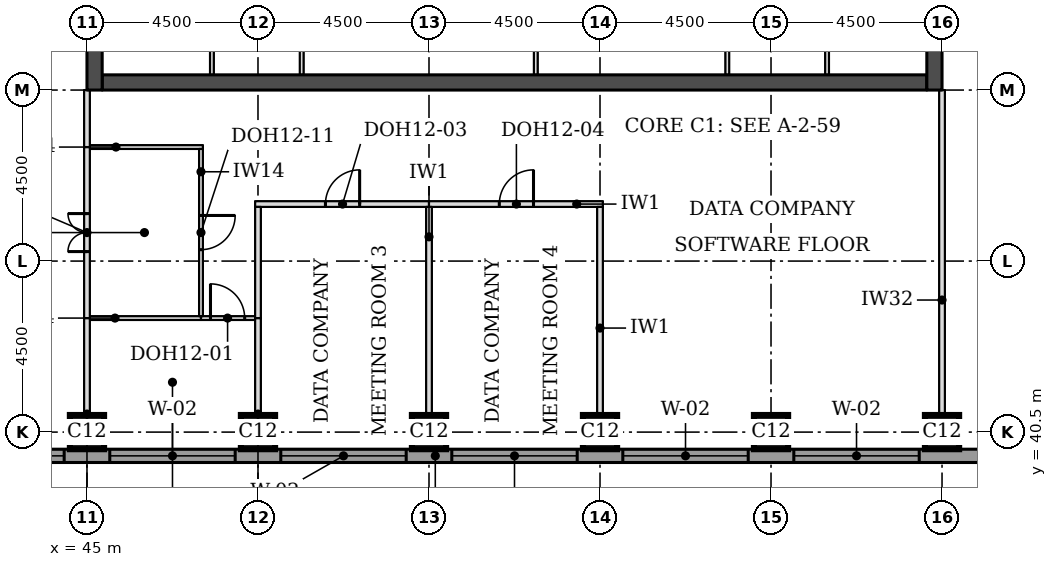
"""IFC4 building model, lengths in metres.
Left out: names, types, materials, properties, quantities, classifications, styles, units other than length and angle.
Written with IfcOpenShell. Run it as: python <this file> out.ifc"""

import sys

from ifc_helpers import new_model, si_unit, direction, frame, frame_2d, origin, origin_2d, place, context, subcontext, project, spatial, rectangle, extrude, element, fill, save


model = new_model("IFC4")
c1 = context("Model", 3, precision=1e-05, world=origin(), true_north=direction((0.0, 1.0)))
c2 = subcontext(c1, "Body", "Model", "MODEL_VIEW")
j1 = project(units=[si_unit("LENGTHUNIT", "METRE"), si_unit("PLANEANGLEUNIT", "RADIAN")], contexts=[c1])
p1 = place(None, origin())
s1 = spatial("IfcSite", under=j1, at=p1, CompositionType="ELEMENT")
p2 = place(p1, origin())
s2 = spatial("IfcBuilding", under=s1, at=p2, CompositionType="ELEMENT")
p3 = place(p2, frame((0.0, 0.0, 245.2)))
s3 = spatial("IfcBuildingStorey", under=s2, at=p3, CompositionType="ELEMENT", Elevation=245.2)
for number, where, z_axis, x_axis in (
    (1, (45.0, 40.5, 0.0), (0.0, 0.0, 1.0), (1.0, 0.0, 0.0)),
    (2, (49.5, 40.5, 0.0), (0.0, 0.0, 1.0), (1.0, 0.0, 0.0)),
    (3, (54.0, 40.5, 0.0), (0.0, 0.0, 1.0), (1.0, 0.0, 0.0)),
    (4, (58.5, 40.5, 0.0), (0.0, 0.0, 1.0), (1.0, 0.0, 0.0)),
    (5, (63.0, 40.5, 0.0), (0.0, 0.0, 1.0), (1.0, 0.0, 0.0)),
    (6, (67.5, 40.5, 0.0), (0.0, 0.0, 1.0), (1.0, 0.0, 0.0)),
):
    element("IfcColumn", number, at=place(p3, frame(where, z_axis=z_axis, x_axis=x_axis)), inside=s3, PredefinedType="COLUMN", context=c2, shape_type="SweptSolid", body=[
        extrude(rectangle(XDim=0.9, YDim=0.9, at=origin_2d()), origin(), (0.0, 0.0, 1.0), 3.7),
    ])
p4 = place(p3, frame((45.4, 49.7, 0.0), z_axis=(0.0, 0.0, 1.0), x_axis=(1.0, 0.0, 0.0)))
e7 = element("IfcWall", 7, at=p4, inside=s3, PredefinedType="SHEAR", context=c2, shape_type="SweptSolid", body=[
    extrude(rectangle(XDim=21.7, YDim=0.4, at=frame_2d((10.85, 0.0))), origin(), (0.0, 0.0, 1.0), 3.7),
])
p5 = place(p3, frame((45.2, 49.5, 0.0), z_axis=(0.0, 0.0, 1.0), x_axis=(0.0, 1.0, 0.0)))
e8 = element("IfcWall", 8, at=p5, inside=s3, PredefinedType="SHEAR", context=c2, shape_type="SweptSolid", body=[
    extrude(rectangle(XDim=22.5, YDim=0.4, at=frame_2d((11.25, 0.0))), origin(), (0.0, 0.0, 1.0), 3.7),
])
p6 = place(p5, frame((4.2, 0.0, 0.0)))
e9 = element("IfcOpeningElement", 9, at=p6, cuts=e8, PredefinedType="OPENING", context=c2, shape_type="SweptSolid", body=[
    extrude(rectangle(XDim=1.8, YDim=2.1, at=frame_2d((0.9, 1.05))), frame((0.0, 0.21, 0.0), z_axis=(0.0, -1.0, 0.0), x_axis=(1.0, 0.0, 0.0)), (0.0, 0.0, 1.0), 0.42),
])
p7 = place(p5, frame((6.9, 0.0, 0.0)))
e10 = element("IfcOpeningElement", 10, at=p7, cuts=e8, PredefinedType="OPENING", context=c2, shape_type="SweptSolid", body=[
    extrude(rectangle(XDim=1.1, YDim=2.1, at=frame_2d((0.55, 1.05))), frame((0.0, 0.21, 0.0), z_axis=(0.0, -1.0, 0.0), x_axis=(1.0, 0.0, 0.0)), (0.0, 0.0, 1.0), 0.42),
])
p8 = place(p5, frame((13.6, 0.0, 0.0)))
e11 = element("IfcOpeningElement", 11, at=p8, cuts=e8, PredefinedType="OPENING", context=c2, shape_type="SweptSolid", body=[
    extrude(rectangle(XDim=1.1, YDim=2.1, at=frame_2d((0.55, 1.05))), frame((0.0, 0.21, 0.0), z_axis=(0.0, -1.0, 0.0), x_axis=(1.0, 0.0, 0.0)), (0.0, 0.0, 1.0), 0.42),
])
p9 = place(p5, frame((16.5, 0.0, 0.0)))
e12 = element("IfcOpeningElement", 12, at=p9, cuts=e8, PredefinedType="OPENING", context=c2, shape_type="SweptSolid", body=[
    extrude(rectangle(XDim=1.8, YDim=2.1, at=frame_2d((0.9, 1.05))), frame((0.0, 0.21, 0.0), z_axis=(0.0, -1.0, 0.0), x_axis=(1.0, 0.0, 0.0)), (0.0, 0.0, 1.0), 0.42),
])
p10 = place(p3, frame((67.3, 49.5, 0.0), z_axis=(0.0, 0.0, 1.0), x_axis=(0.0, 1.0, 0.0)))
e13 = element("IfcWall", 13, at=p10, inside=s3, PredefinedType="SHEAR", context=c2, shape_type="SweptSolid", body=[
    extrude(rectangle(XDim=22.5, YDim=0.4, at=frame_2d((11.25, 0.0))), origin(), (0.0, 0.0, 1.0), 3.7),
])
p11 = place(p10, frame((4.2, 0.0, 0.0)))
e14 = element("IfcOpeningElement", 14, at=p11, cuts=e13, PredefinedType="OPENING", context=c2, shape_type="SweptSolid", body=[
    extrude(rectangle(XDim=1.8, YDim=2.1, at=frame_2d((0.9, 1.05))), frame((0.0, 0.21, 0.0), z_axis=(0.0, -1.0, 0.0), x_axis=(1.0, 0.0, 0.0)), (0.0, 0.0, 1.0), 0.42),
])
p12 = place(p10, frame((6.9, 0.0, 0.0)))
e15 = element("IfcOpeningElement", 15, at=p12, cuts=e13, PredefinedType="OPENING", context=c2, shape_type="SweptSolid", body=[
    extrude(rectangle(XDim=1.1, YDim=2.1, at=frame_2d((0.55, 1.05))), frame((0.0, 0.21, 0.0), z_axis=(0.0, -1.0, 0.0), x_axis=(1.0, 0.0, 0.0)), (0.0, 0.0, 1.0), 0.42),
])
p13 = place(p10, frame((13.6, 0.0, 0.0)))
e16 = element("IfcOpeningElement", 16, at=p13, cuts=e13, PredefinedType="OPENING", context=c2, shape_type="SweptSolid", body=[
    extrude(rectangle(XDim=1.1, YDim=2.1, at=frame_2d((0.55, 1.05))), frame((0.0, 0.21, 0.0), z_axis=(0.0, -1.0, 0.0), x_axis=(1.0, 0.0, 0.0)), (0.0, 0.0, 1.0), 0.42),
])
p14 = place(p10, frame((16.5, 0.0, 0.0)))
e17 = element("IfcOpeningElement", 17, at=p14, cuts=e13, PredefinedType="OPENING", context=c2, shape_type="SweptSolid", body=[
    extrude(rectangle(XDim=1.8, YDim=2.1, at=frame_2d((0.9, 1.05))), frame((0.0, 0.21, 0.0), z_axis=(0.0, -1.0, 0.0), x_axis=(1.0, 0.0, 0.0)), (0.0, 0.0, 1.0), 0.42),
])
p15 = place(p3, frame((36.0, 39.875, 0.0), z_axis=(0.0, 0.0, 1.0), x_axis=(1.0, 0.0, 0.0)))
e18 = element("IfcWall", 18, at=p15, inside=s3, PredefinedType="STANDARD", context=c2, shape_type="SweptSolid", body=[
    extrude(rectangle(XDim=36.331, YDim=0.35, at=frame_2d((18.166, 0.0))), origin(), (0.0, 0.0, 1.0), 3.525),
])
p16 = place(p15, frame((5.1, 0.0, 0.9)))
e19 = element("IfcOpeningElement", 19, at=p16, cuts=e18, PredefinedType="OPENING", context=c2, shape_type="SweptSolid", body=[
    extrude(rectangle(XDim=3.3, YDim=1.9, at=frame_2d((1.65, 0.95))), frame((0.0, 0.185, 0.0), z_axis=(0.0, -1.0, 0.0), x_axis=(1.0, 0.0, 0.0)), (0.0, 0.0, 1.0), 0.37),
])
p17 = place(p15, frame((9.6, 0.0, 0.9)))
e20 = element("IfcOpeningElement", 20, at=p17, cuts=e18, PredefinedType="OPENING", context=c2, shape_type="SweptSolid", body=[
    extrude(rectangle(XDim=3.3, YDim=1.9, at=frame_2d((1.65, 0.95))), frame((0.0, 0.185, 0.0), z_axis=(0.0, -1.0, 0.0), x_axis=(1.0, 0.0, 0.0)), (0.0, 0.0, 1.0), 0.37),
])
p18 = place(p15, frame((14.1, 0.0, 0.9)))
e21 = element("IfcOpeningElement", 21, at=p18, cuts=e18, PredefinedType="OPENING", context=c2, shape_type="SweptSolid", body=[
    extrude(rectangle(XDim=3.3, YDim=1.9, at=frame_2d((1.65, 0.95))), frame((0.0, 0.185, 0.0), z_axis=(0.0, -1.0, 0.0), x_axis=(1.0, 0.0, 0.0)), (0.0, 0.0, 1.0), 0.37),
])
p19 = place(p15, frame((18.6, 0.0, 0.9)))
e22 = element("IfcOpeningElement", 22, at=p19, cuts=e18, PredefinedType="OPENING", context=c2, shape_type="SweptSolid", body=[
    extrude(rectangle(XDim=3.3, YDim=1.9, at=frame_2d((1.65, 0.95))), frame((0.0, 0.185, 0.0), z_axis=(0.0, -1.0, 0.0), x_axis=(1.0, 0.0, 0.0)), (0.0, 0.0, 1.0), 0.37),
])
p20 = place(p15, frame((23.1, 0.0, 0.9)))
e23 = element("IfcOpeningElement", 23, at=p20, cuts=e18, PredefinedType="OPENING", context=c2, shape_type="SweptSolid", body=[
    extrude(rectangle(XDim=3.3, YDim=1.9, at=frame_2d((1.65, 0.95))), frame((0.0, 0.185, 0.0), z_axis=(0.0, -1.0, 0.0), x_axis=(1.0, 0.0, 0.0)), (0.0, 0.0, 1.0), 0.37),
])
p21 = place(p15, frame((27.6, 0.0, 0.9)))
e24 = element("IfcOpeningElement", 24, at=p21, cuts=e18, PredefinedType="OPENING", context=c2, shape_type="SweptSolid", body=[
    extrude(rectangle(XDim=3.3, YDim=1.9, at=frame_2d((1.65, 0.95))), frame((0.0, 0.185, 0.0), z_axis=(0.0, -1.0, 0.0), x_axis=(1.0, 0.0, 0.0)), (0.0, 0.0, 1.0), 0.37),
])
p22 = place(p3, frame((45.075, 43.5, 0.0), z_axis=(0.0, 0.0, 1.0), x_axis=(1.0, 0.0, 0.0)))
e25 = element("IfcWall", 25, at=p22, inside=s3, PredefinedType="PARTITIONING", context=c2, shape_type="SweptSolid", body=[
    extrude(rectangle(XDim=2.925, YDim=0.1, at=frame_2d((1.462, 0.0))), origin(), (0.0, 0.0, 1.0), 3.55),
])
p23 = place(p3, frame((48.0, 43.5, 0.0), z_axis=(0.0, 0.0, 1.0), x_axis=(1.0, 0.0, 0.0)))
e26 = element("IfcWall", 26, at=p23, inside=s3, PredefinedType="PARTITIONING", context=c2, shape_type="SweptSolid", body=[
    extrude(rectangle(XDim=1.425, YDim=0.1, at=frame_2d((0.712, 0.0))), origin(), (0.0, 0.0, 1.0), 3.55),
])
p24 = place(p23, frame((0.25, 0.0, 0.0)))
e27 = element("IfcOpeningElement", 27, at=p24, cuts=e26, PredefinedType="OPENING", context=c2, shape_type="SweptSolid", body=[
    extrude(rectangle(XDim=0.9, YDim=2.1, at=frame_2d((0.45, 1.05))), frame((0.0, 0.06, 0.0), z_axis=(0.0, -1.0, 0.0), x_axis=(1.0, 0.0, 0.0)), (0.0, 0.0, 1.0), 0.12),
])
p25 = place(p3, frame((49.425, 46.5, 0.0), z_axis=(0.0, 0.0, 1.0), x_axis=(1.0, 0.0, 0.0)))
e28 = element("IfcWall", 28, at=p25, inside=s3, PredefinedType="PARTITIONING", context=c2, shape_type="SweptSolid", body=[
    extrude(rectangle(XDim=4.575, YDim=0.15, at=frame_2d((2.288, 0.0))), origin(), (0.0, 0.0, 1.0), 3.55),
])
p26 = place(p25, frame((1.85, 0.0, 0.0)))
e29 = element("IfcOpeningElement", 29, at=p26, cuts=e28, PredefinedType="OPENING", context=c2, shape_type="SweptSolid", body=[
    extrude(rectangle(XDim=0.9, YDim=2.1, at=frame_2d((0.45, 1.05))), frame((0.0, 0.085, 0.0), z_axis=(0.0, -1.0, 0.0), x_axis=(1.0, 0.0, 0.0)), (0.0, 0.0, 1.0), 0.17),
])
p27 = place(p3, frame((54.0, 46.5, 0.0), z_axis=(0.0, 0.0, 1.0), x_axis=(1.0, 0.0, 0.0)))
e30 = element("IfcWall", 30, at=p27, inside=s3, PredefinedType="PARTITIONING", context=c2, shape_type="SweptSolid", body=[
    extrude(rectangle(XDim=4.575, YDim=0.15, at=frame_2d((2.288, 0.0))), origin(), (0.0, 0.0, 1.0), 3.55),
])
p28 = place(p27, frame((1.85, 0.0, 0.0)))
e31 = element("IfcOpeningElement", 31, at=p28, cuts=e30, PredefinedType="OPENING", context=c2, shape_type="SweptSolid", body=[
    extrude(rectangle(XDim=0.9, YDim=2.1, at=frame_2d((0.45, 1.05))), frame((0.0, 0.085, 0.0), z_axis=(0.0, -1.0, 0.0), x_axis=(1.0, 0.0, 0.0)), (0.0, 0.0, 1.0), 0.17),
])
p29 = place(p3, frame((45.075, 48.0, 0.0), z_axis=(0.0, 0.0, 1.0), x_axis=(1.0, 0.0, 0.0)))
e32 = element("IfcWall", 32, at=p29, inside=s3, PredefinedType="PARTITIONING", context=c2, shape_type="SweptSolid", body=[
    extrude(rectangle(XDim=2.975, YDim=0.1, at=frame_2d((1.488, 0.0))), origin(), (0.0, 0.0, 1.0), 3.55),
])
p30 = place(p3, frame((45.0, 40.05, 0.0), z_axis=(0.0, 0.0, 1.0), x_axis=(0.0, 1.0, 0.0)))
e33 = element("IfcWall", 33, at=p30, inside=s3, PredefinedType="PARTITIONING", context=c2, shape_type="SweptSolid", body=[
    extrude(rectangle(XDim=3.45, YDim=0.15, at=frame_2d((1.725, 0.0))), origin(), (0.0, 0.0, 1.0), 3.022),
])
p31 = place(p3, frame((49.5, 40.05, 0.0), z_axis=(0.0, 0.0, 1.0), x_axis=(0.0, 1.0, 0.0)))
e34 = element("IfcWall", 34, at=p31, inside=s3, PredefinedType="PARTITIONING", context=c2, shape_type="SweptSolid", body=[
    extrude(rectangle(XDim=3.45, YDim=0.15, at=frame_2d((1.725, 0.0))), origin(), (0.0, 0.0, 1.0), 3.55),
])
for number, where, z_axis, x_axis in (
    (35, (54.0, 40.05, 0.0), (0.0, 0.0, 1.0), (0.0, 1.0, 0.0)),
    (36, (58.5, 40.05, 0.0), (0.0, 0.0, 1.0), (0.0, 1.0, 0.0)),
):
    element("IfcWall", number, at=place(p3, frame(where, z_axis=z_axis, x_axis=x_axis)), inside=s3, PredefinedType="PARTITIONING", context=c2, shape_type="SweptSolid", body=[
        extrude(rectangle(XDim=6.375, YDim=0.15, at=frame_2d((3.188, 0.0))), origin(), (0.0, 0.0, 1.0), 3.55),
    ])
p32 = place(p3, frame((67.5, 40.05, 0.0), z_axis=(0.0, 0.0, 1.0), x_axis=(0.0, 1.0, 0.0)))
e37 = element("IfcWall", 37, at=p32, inside=s3, PredefinedType="PARTITIONING", context=c2, shape_type="SweptSolid", body=[
    extrude(rectangle(XDim=9.45, YDim=0.15, at=frame_2d((4.725, 0.0))), origin(), (0.0, 0.0, 1.0), 3.022),
])
p33 = place(p3, frame((45.0, 43.5, 0.0), z_axis=(0.0, 0.0, 1.0), x_axis=(0.0, 1.0, 0.0)))
e38 = element("IfcWall", 38, at=p33, inside=s3, PredefinedType="PARTITIONING", context=c2, shape_type="SweptSolid", body=[
    extrude(rectangle(XDim=4.5, YDim=0.15, at=frame_2d((2.25, 0.0))), origin(), (0.0, 0.0, 1.0), 3.022),
])
p34 = place(p33, frame((1.75, 0.0, 0.0)))
e39 = element("IfcOpeningElement", 39, at=p34, cuts=e38, PredefinedType="OPENING", context=c2, shape_type="SweptSolid", body=[
    extrude(rectangle(XDim=1.0, YDim=2.1, at=frame_2d((0.5, 1.05))), frame((0.0, 0.085, 0.0), z_axis=(0.0, -1.0, 0.0), x_axis=(1.0, 0.0, 0.0)), (0.0, 0.0, 1.0), 0.17),
])
p35 = place(p3, frame((49.5, 43.5, 0.0), z_axis=(0.0, 0.0, 1.0), x_axis=(0.0, 1.0, 0.0)))
e40 = element("IfcWall", 40, at=p35, inside=s3, PredefinedType="PARTITIONING", context=c2, shape_type="SweptSolid", body=[
    extrude(rectangle(XDim=2.925, YDim=0.15, at=frame_2d((1.462, 0.0))), origin(), (0.0, 0.0, 1.0), 3.55),
])
p36 = place(p3, frame((48.0, 43.55, 0.0), z_axis=(0.0, 0.0, 1.0), x_axis=(0.0, 1.0, 0.0)))
e41 = element("IfcWall", 41, at=p36, inside=s3, PredefinedType="PARTITIONING", context=c2, shape_type="SweptSolid", body=[
    extrude(rectangle(XDim=4.4, YDim=0.1, at=frame_2d((2.2, 0.0))), origin(), (0.0, 0.0, 1.0), 3.55),
])
p37 = place(p36, frame((1.75, 0.0, 0.0)))
e42 = element("IfcOpeningElement", 42, at=p37, cuts=e41, PredefinedType="OPENING", context=c2, shape_type="SweptSolid", body=[
    extrude(rectangle(XDim=0.9, YDim=2.1, at=frame_2d((0.45, 1.05))), frame((0.0, 0.06, 0.0), z_axis=(0.0, -1.0, 0.0), x_axis=(1.0, 0.0, 0.0)), (0.0, 0.0, 1.0), 0.12),
])
p38 = place(p3, frame((45.0, 48.0, 0.0), z_axis=(0.0, 0.0, 1.0), x_axis=(0.0, 1.0, 0.0)))
e43 = element("IfcWall", 43, at=p38, inside=s3, PredefinedType="PARTITIONING", context=c2, shape_type="SweptSolid", body=[
    extrude(rectangle(XDim=1.5, YDim=0.15, at=frame_2d((0.75, 0.0))), origin(), (0.0, 0.0, 1.0), 3.022),
])
for number, where, z_axis, x_axis in (
    (44, (48.288, 49.9, 0.0), (0.0, 0.0, 1.0), (0.0, 1.0, 0.0)),
    (45, (50.65, 49.9, 0.0), (0.0, 0.0, 1.0), (0.0, 1.0, 0.0)),
    (46, (56.81, 49.9, 0.0), (0.0, 0.0, 1.0), (0.0, 1.0, 0.0)),
    (47, (61.85, 49.9, 0.0), (0.0, 0.0, 1.0), (0.0, 1.0, 0.0)),
    (48, (64.475, 49.9, 0.0), (0.0, 0.0, 1.0), (0.0, 1.0, 0.0)),
):
    element("IfcWall", number, at=place(p3, frame(where, z_axis=z_axis, x_axis=x_axis)), inside=s3, PredefinedType="PARTITIONING", context=c2, shape_type="SweptSolid", body=[
        extrude(rectangle(XDim=3.1, YDim=0.1, at=frame_2d((1.55, 0.0))), origin(), (0.0, 0.0, 1.0), 3.55),
    ])
p39 = place(p16, origin())
e49 = element("IfcWindow", 49, at=p39, inside=s3, PartitioningType="SINGLE_PANEL", PredefinedType="WINDOW", context=c2, shape_type="SweptSolid", body=[
    extrude(rectangle(XDim=3.3, YDim=1.9, at=frame_2d((1.65, 0.95))), frame((0.0, 0.085, 0.0), z_axis=(0.0, -1.0, 0.0), x_axis=(1.0, 0.0, 0.0)), (0.0, 0.0, 1.0), 0.06),
])
fill(e19, e49)
p40 = place(p17, origin())
e50 = element("IfcWindow", 50, at=p40, inside=s3, PartitioningType="SINGLE_PANEL", PredefinedType="WINDOW", context=c2, shape_type="SweptSolid", body=[
    extrude(rectangle(XDim=3.3, YDim=1.9, at=frame_2d((1.65, 0.95))), frame((0.0, 0.085, 0.0), z_axis=(0.0, -1.0, 0.0), x_axis=(1.0, 0.0, 0.0)), (0.0, 0.0, 1.0), 0.06),
])
fill(e20, e50)
p41 = place(p18, origin())
e51 = element("IfcWindow", 51, at=p41, inside=s3, PartitioningType="SINGLE_PANEL", PredefinedType="WINDOW", context=c2, shape_type="SweptSolid", body=[
    extrude(rectangle(XDim=3.3, YDim=1.9, at=frame_2d((1.65, 0.95))), frame((0.0, 0.085, 0.0), z_axis=(0.0, -1.0, 0.0), x_axis=(1.0, 0.0, 0.0)), (0.0, 0.0, 1.0), 0.06),
])
fill(e21, e51)
p42 = place(p19, origin())
e52 = element("IfcWindow", 52, at=p42, inside=s3, PartitioningType="SINGLE_PANEL", PredefinedType="WINDOW", context=c2, shape_type="SweptSolid", body=[
    extrude(rectangle(XDim=3.3, YDim=1.9, at=frame_2d((1.65, 0.95))), frame((0.0, 0.085, 0.0), z_axis=(0.0, -1.0, 0.0), x_axis=(1.0, 0.0, 0.0)), (0.0, 0.0, 1.0), 0.06),
])
fill(e22, e52)
p43 = place(p20, origin())
e53 = element("IfcWindow", 53, at=p43, inside=s3, PartitioningType="SINGLE_PANEL", PredefinedType="WINDOW", context=c2, shape_type="SweptSolid", body=[
    extrude(rectangle(XDim=3.3, YDim=1.9, at=frame_2d((1.65, 0.95))), frame((0.0, 0.085, 0.0), z_axis=(0.0, -1.0, 0.0), x_axis=(1.0, 0.0, 0.0)), (0.0, 0.0, 1.0), 0.06),
])
fill(e23, e53)
p44 = place(p21, origin())
e54 = element("IfcWindow", 54, at=p44, inside=s3, PartitioningType="SINGLE_PANEL", PredefinedType="WINDOW", context=c2, shape_type="SweptSolid", body=[
    extrude(rectangle(XDim=3.3, YDim=1.9, at=frame_2d((1.65, 0.95))), frame((0.0, 0.085, 0.0), z_axis=(0.0, -1.0, 0.0), x_axis=(1.0, 0.0, 0.0)), (0.0, 0.0, 1.0), 0.06),
])
fill(e24, e54)
p45 = place(p34, origin())
e55 = element("IfcDoor", 55, at=p45, inside=s3, OperationType="DOUBLE_DOOR_SINGLE_SWING", PredefinedType="DOOR", context=c2, shape_type="SweptSolid", body=[
    extrude(rectangle(XDim=1.0, YDim=2.1, at=frame_2d((0.5, 1.05))), frame((0.0, 0.025, 0.0), z_axis=(0.0, -1.0, 0.0), x_axis=(1.0, 0.0, 0.0)), (0.0, 0.0, 1.0), 0.05),
])
fill(e39, e55)
p46 = place(p37, frame((0.9, 0.0, 0.0), z_axis=(0.0, 0.0, 1.0), x_axis=(-1.0, 0.0, 0.0)))
e56 = element("IfcDoor", 56, at=p46, inside=s3, OperationType="SINGLE_SWING_LEFT", PredefinedType="DOOR", context=c2, shape_type="SweptSolid", body=[
    extrude(rectangle(XDim=0.9, YDim=2.1, at=frame_2d((0.45, 1.05))), frame((0.0, 0.025, 0.0), z_axis=(0.0, -1.0, 0.0), x_axis=(1.0, 0.0, 0.0)), (0.0, 0.0, 1.0), 0.05),
])
fill(e42, e56)
p47 = place(p26, origin())
e57 = element("IfcDoor", 57, at=p47, inside=s3, OperationType="SINGLE_SWING_RIGHT", PredefinedType="DOOR", context=c2, shape_type="SweptSolid", body=[
    extrude(rectangle(XDim=0.9, YDim=2.1, at=frame_2d((0.45, 1.05))), frame((0.0, 0.025, 0.0), z_axis=(0.0, -1.0, 0.0), x_axis=(1.0, 0.0, 0.0)), (0.0, 0.0, 1.0), 0.05),
])
fill(e29, e57)
p48 = place(p28, origin())
e58 = element("IfcDoor", 58, at=p48, inside=s3, OperationType="SINGLE_SWING_RIGHT", PredefinedType="DOOR", context=c2, shape_type="SweptSolid", body=[
    extrude(rectangle(XDim=0.9, YDim=2.1, at=frame_2d((0.45, 1.05))), frame((0.0, 0.025, 0.0), z_axis=(0.0, -1.0, 0.0), x_axis=(1.0, 0.0, 0.0)), (0.0, 0.0, 1.0), 0.05),
])
fill(e31, e58)
p49 = place(p24, origin())
e59 = element("IfcDoor", 59, at=p49, inside=s3, OperationType="SINGLE_SWING_LEFT", PredefinedType="DOOR", context=c2, shape_type="SweptSolid", body=[
    extrude(rectangle(XDim=0.9, YDim=2.1, at=frame_2d((0.45, 1.05))), frame((0.0, 0.025, 0.0), z_axis=(0.0, -1.0, 0.0), x_axis=(1.0, 0.0, 0.0)), (0.0, 0.0, 1.0), 0.05),
])
fill(e27, e59)
save(model, sys.argv[1])
